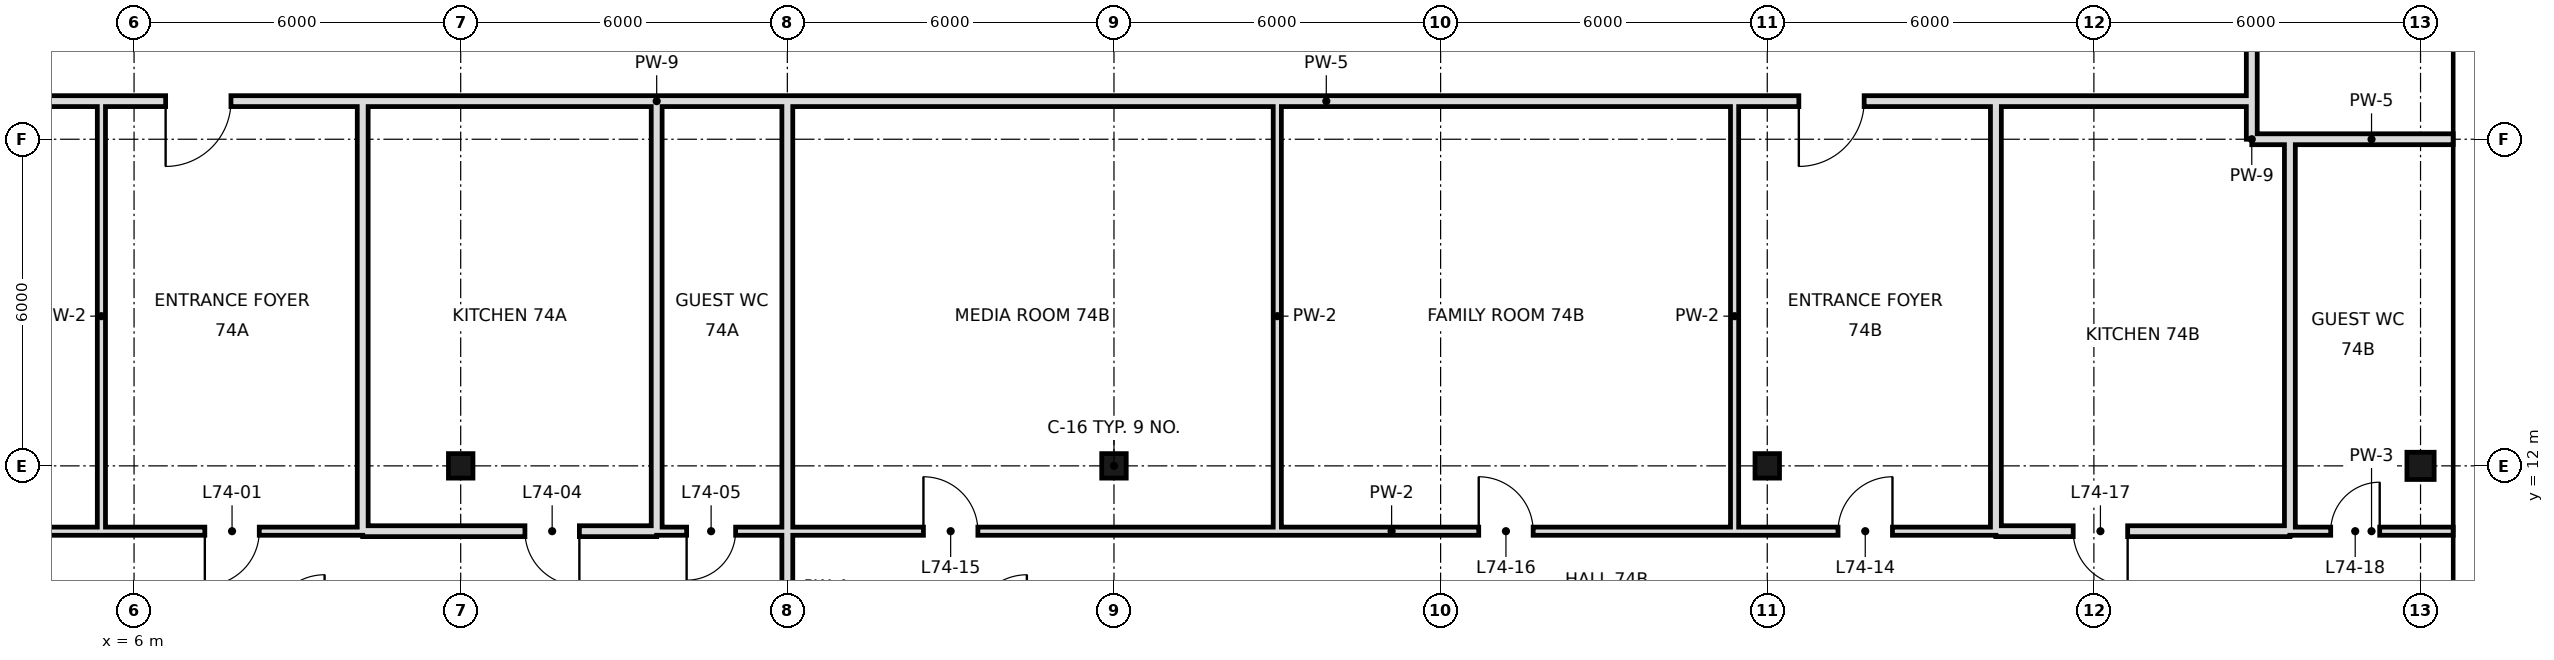
"""IFC4 building model, lengths in metres.
Left out: names, types, materials, properties, quantities, classifications, styles, units other than length and angle.
Written with IfcOpenShell. Run it as: python <this file> out.ifc"""

import sys

from ifc_helpers import new_model, si_unit, direction, frame, frame_2d, origin, origin_2d, place, context, subcontext, project, spatial, rectangle, hollow_rectangle, extrude, element, fill, save


model = new_model("IFC4")
c1 = context("Model", 3, precision=1e-05, world=origin(), true_north=direction((0.0, 1.0)))
c2 = subcontext(c1, "Body", "Model", "MODEL_VIEW")
j1 = project(units=[si_unit("LENGTHUNIT", "METRE"), si_unit("PLANEANGLEUNIT", "RADIAN")], contexts=[c1])
p1 = place(None, origin())
s1 = spatial("IfcSite", under=j1, at=p1, CompositionType="ELEMENT")
p2 = place(p1, origin())
s2 = spatial("IfcBuilding", under=s1, at=p2, CompositionType="ELEMENT")
p3 = place(p2, frame((0.0, 0.0, 312.4)))
s3 = spatial("IfcBuildingStorey", under=s2, at=p3, CompositionType="ELEMENT", Elevation=312.4)
for number, where, z_axis, x_axis in (
    (1, (12.0, 12.0, 0.0), (0.0, 0.0, 1.0), (1.0, 0.0, 0.0)),
    (2, (24.0, 12.0, 0.0), (0.0, 0.0, 1.0), (1.0, 0.0, 0.0)),
    (3, (36.0, 12.0, 0.0), (0.0, 0.0, 1.0), (1.0, 0.0, 0.0)),
):
    element("IfcColumn", number, at=place(p3, frame(where, z_axis=z_axis, x_axis=x_axis)), inside=s3, PredefinedType="COLUMN", context=c2, shape_type="SweptSolid", body=[
        extrude(hollow_rectangle(XDim=0.45, YDim=0.45, WallThickness=0.022, at=origin_2d()), origin(), (0.0, 0.0, 1.0), 3.6),
    ])
p4 = place(p3, frame((48.0, 12.0, 0.0), z_axis=(0.0, 0.0, 1.0), x_axis=(1.0, 0.0, 0.0)))
e4 = element("IfcColumn", 4, at=p4, inside=s3, PredefinedType="COLUMN", context=c2, shape_type="SweptSolid", body=[
    extrude(hollow_rectangle(XDim=0.5, YDim=0.5, WallThickness=0.025, at=origin_2d()), origin(), (0.0, 0.0, 1.0), 3.6),
])
for number, where, z_axis, x_axis in (
    (5, (10.2, 10.8, 0.0), (0.0, 0.0, 1.0), (0.0, 1.0, 0.0)),
    (6, (15.6, 10.8, 0.0), (0.0, 0.0, 1.0), (0.0, 1.0, 0.0)),
):
    element("IfcWall", number, at=place(p3, frame(where, z_axis=z_axis, x_axis=x_axis)), inside=s3, PredefinedType="SOLIDWALL", context=c2, shape_type="SweptSolid", body=[
        extrude(rectangle(XDim=7.9, YDim=0.2, at=frame_2d((3.95, 0.0))), origin(), (0.0, 0.0, 1.0), 2.72),
    ])
p5 = place(p3, frame((18.0, -0.6, 0.0), z_axis=(0.0, 0.0, 1.0), x_axis=(0.0, 1.0, 0.0)))
e7 = element("IfcWall", 7, at=p5, inside=s3, PredefinedType="SOLIDWALL", context=c2, shape_type="SweptSolid", body=[
    extrude(rectangle(XDim=19.3, YDim=0.2, at=frame_2d((9.65, 0.0))), origin(), (0.0, 0.0, 1.0), 2.72),
])
for number, where, z_axis, x_axis in (
    (8, (27.0, 10.8, 0.0), (0.0, 0.0, 1.0), (0.0, 1.0, 0.0)),
    (9, (35.4, 10.8, 0.0), (0.0, 0.0, 1.0), (0.0, 1.0, 0.0)),
):
    element("IfcWall", number, at=place(p3, frame(where, z_axis=z_axis, x_axis=x_axis)), inside=s3, PredefinedType="PARTITIONING", context=c2, shape_type="SweptSolid", body=[
        extrude(rectangle(XDim=7.9, YDim=0.15, at=frame_2d((3.95, 0.0))), origin(), (0.0, 0.0, 1.0), 3.42),
    ])
p6 = place(p3, frame((40.2, 10.8, 0.0), z_axis=(0.0, 0.0, 1.0), x_axis=(0.0, 1.0, 0.0)))
e10 = element("IfcWall", 10, at=p6, inside=s3, PredefinedType="SOLIDWALL", context=c2, shape_type="SweptSolid", body=[
    extrude(rectangle(XDim=7.9, YDim=0.2, at=frame_2d((3.95, 0.0))), origin(), (0.0, 0.0, 1.0), 2.72),
])
p7 = place(p3, frame((44.9, 18.7, 0.0), z_axis=(0.0, 0.0, 1.0), x_axis=(0.0, 1.0, 0.0)))
e11 = element("IfcWall", 11, at=p7, inside=s3, PredefinedType="SOLIDWALL", context=c2, shape_type="SweptSolid", body=[
    extrude(rectangle(XDim=27.249, YDim=0.2, at=frame_2d((13.625, 0.0))), origin(), (0.0, 0.0, 1.0), 2.97),
])
p8 = place(p7, frame((7.66, 0.0, 0.0)))
e12 = element("IfcOpeningElement", 12, at=p8, cuts=e11, PredefinedType="OPENING", context=c2, shape_type="SweptSolid", body=[
    extrude(rectangle(XDim=1.2, YDim=2.4, at=frame_2d((0.6, 1.2))), frame((0.0, 0.11, 0.0), z_axis=(0.0, -1.0, 0.0), x_axis=(1.0, 0.0, 0.0)), (0.0, 0.0, 1.0), 0.22),
])
p9 = place(p3, frame((44.9, 18.0, 0.0), z_axis=(0.0, 0.0, 1.0), x_axis=(0.0, 1.0, 0.0)))
e13 = element("IfcWall", 13, at=p9, inside=s3, PredefinedType="SOLIDWALL", context=c2, shape_type="SweptSolid", body=[
    extrude(rectangle(XDim=0.7, YDim=0.2, at=frame_2d((0.35, 0.0))), origin(), (0.0, 0.0, 1.0), 2.97),
])
p10 = place(p3, frame((45.6, 10.8, 0.0), z_axis=(0.0, 0.0, 1.0), x_axis=(0.0, 1.0, 0.0)))
e14 = element("IfcWall", 14, at=p10, inside=s3, PredefinedType="SOLIDWALL", context=c2, shape_type="SweptSolid", body=[
    extrude(rectangle(XDim=7.2, YDim=0.2, at=frame_2d((3.6, 0.0))), origin(), (0.0, 0.0, 1.0), 2.72),
])
p11 = place(p3, frame((5.4, 10.8, 0.0), z_axis=(0.0, 0.0, 1.0), x_axis=(0.0, 1.0, 0.0)))
e15 = element("IfcWall", 15, at=p11, inside=s3, PredefinedType="PARTITIONING", context=c2, shape_type="SweptSolid", body=[
    extrude(rectangle(XDim=7.9, YDim=0.15, at=frame_2d((3.95, 0.0))), origin(), (0.0, 0.0, 1.0), 3.42),
])
p12 = place(p3, frame((10.2, 10.8, 0.0), z_axis=(0.0, 0.0, 1.0), x_axis=(1.0, 0.0, 0.0)))
e16 = element("IfcWall", 16, at=p12, inside=s3, PredefinedType="SOLIDWALL", context=c2, shape_type="SweptSolid", body=[
    extrude(rectangle(XDim=5.4, YDim=0.2, at=frame_2d((2.7, 0.0))), origin(), (0.0, 0.0, 1.0), 2.72),
])
p13 = place(p12, frame((2.98, 0.0, 0.0)))
e17 = element("IfcOpeningElement", 17, at=p13, cuts=e16, PredefinedType="OPENING", context=c2, shape_type="SweptSolid", body=[
    extrude(rectangle(XDim=1.0, YDim=2.4, at=frame_2d((0.5, 1.2))), frame((0.0, 0.11, 0.0), z_axis=(0.0, -1.0, 0.0), x_axis=(1.0, 0.0, 0.0)), (0.0, 0.0, 1.0), 0.22),
])
p14 = place(p3, frame((40.2, 10.8, 0.0), z_axis=(0.0, 0.0, 1.0), x_axis=(1.0, 0.0, 0.0)))
e18 = element("IfcWall", 18, at=p14, inside=s3, PredefinedType="SOLIDWALL", context=c2, shape_type="SweptSolid", body=[
    extrude(rectangle(XDim=5.4, YDim=0.2, at=frame_2d((2.7, 0.0))), origin(), (0.0, 0.0, 1.0), 2.72),
])
p15 = place(p14, frame((1.42, 0.0, 0.0)))
e19 = element("IfcOpeningElement", 19, at=p15, cuts=e18, PredefinedType="OPENING", context=c2, shape_type="SweptSolid", body=[
    extrude(rectangle(XDim=1.0, YDim=2.4, at=frame_2d((0.5, 1.2))), frame((0.0, 0.11, 0.0), z_axis=(0.0, -1.0, 0.0), x_axis=(1.0, 0.0, 0.0)), (0.0, 0.0, 1.0), 0.22),
])
p16 = place(p3, frame((-18.6, 10.8, 0.0), z_axis=(0.0, 0.0, 1.0), x_axis=(1.0, 0.0, 0.0)))
e20 = element("IfcWall", 20, at=p16, inside=s3, PredefinedType="PARTITIONING", context=c2, shape_type="SweptSolid", body=[
    extrude(rectangle(XDim=28.8, YDim=0.15, at=frame_2d((14.4, 0.0))), origin(), (0.0, 0.0, 1.0), 3.42),
])
p17 = place(p16, frame((25.9, 0.0, 0.0)))
e21 = element("IfcOpeningElement", 21, at=p17, cuts=e20, PredefinedType="OPENING", context=c2, shape_type="SweptSolid", body=[
    extrude(rectangle(XDim=1.0, YDim=2.4, at=frame_2d((0.5, 1.2))), frame((0.0, 0.085, 0.0), z_axis=(0.0, -1.0, 0.0), x_axis=(1.0, 0.0, 0.0)), (0.0, 0.0, 1.0), 0.17),
])
p18 = place(p16, frame((11.35, 0.0, 0.0)))
e22 = element("IfcOpeningElement", 22, at=p18, cuts=e20, PredefinedType="OPENING", context=c2, shape_type="SweptSolid", body=[
    extrude(rectangle(XDim=1.0, YDim=2.4, at=frame_2d((0.5, 1.2))), frame((0.0, 0.085, 0.0), z_axis=(0.0, -1.0, 0.0), x_axis=(1.0, 0.0, 0.0)), (0.0, 0.0, 1.0), 0.17),
])
p19 = place(p16, frame((15.82, 0.0, 0.0)))
e23 = element("IfcOpeningElement", 23, at=p19, cuts=e20, PredefinedType="OPENING", context=c2, shape_type="SweptSolid", body=[
    extrude(rectangle(XDim=1.0, YDim=2.4, at=frame_2d((0.5, 1.2))), frame((0.0, 0.085, 0.0), z_axis=(0.0, -1.0, 0.0), x_axis=(1.0, 0.0, 0.0)), (0.0, 0.0, 1.0), 0.17),
])
p20 = place(p3, frame((18.0, 10.8, 0.0), z_axis=(0.0, 0.0, 1.0), x_axis=(1.0, 0.0, 0.0)))
e24 = element("IfcWall", 24, at=p20, inside=s3, PredefinedType="PARTITIONING", context=c2, shape_type="SweptSolid", body=[
    extrude(rectangle(XDim=22.2, YDim=0.15, at=frame_2d((11.1, 0.0))), origin(), (0.0, 0.0, 1.0), 3.42),
])
p21 = place(p20, frame((19.3, 0.0, 0.0)))
e25 = element("IfcOpeningElement", 25, at=p21, cuts=e24, PredefinedType="OPENING", context=c2, shape_type="SweptSolid", body=[
    extrude(rectangle(XDim=1.0, YDim=2.4, at=frame_2d((0.5, 1.2))), frame((0.0, 0.085, 0.0), z_axis=(0.0, -1.0, 0.0), x_axis=(1.0, 0.0, 0.0)), (0.0, 0.0, 1.0), 0.17),
])
p22 = place(p20, frame((2.5, 0.0, 0.0)))
e26 = element("IfcOpeningElement", 26, at=p22, cuts=e24, PredefinedType="OPENING", context=c2, shape_type="SweptSolid", body=[
    extrude(rectangle(XDim=1.0, YDim=2.4, at=frame_2d((0.5, 1.2))), frame((0.0, 0.085, 0.0), z_axis=(0.0, -1.0, 0.0), x_axis=(1.0, 0.0, 0.0)), (0.0, 0.0, 1.0), 0.17),
])
p23 = place(p20, frame((12.7, 0.0, 0.0)))
e27 = element("IfcOpeningElement", 27, at=p23, cuts=e24, PredefinedType="OPENING", context=c2, shape_type="SweptSolid", body=[
    extrude(rectangle(XDim=1.0, YDim=2.4, at=frame_2d((0.5, 1.2))), frame((0.0, 0.085, 0.0), z_axis=(0.0, -1.0, 0.0), x_axis=(1.0, 0.0, 0.0)), (0.0, 0.0, 1.0), 0.17),
])
p24 = place(p3, frame((15.6, 10.8, 0.0), z_axis=(0.0, 0.0, 1.0), x_axis=(1.0, 0.0, 0.0)))
e28 = element("IfcWall", 28, at=p24, inside=s3, PredefinedType="PARTITIONING", context=c2, shape_type="SweptSolid", body=[
    extrude(rectangle(XDim=2.4, YDim=0.15, at=frame_2d((1.2, 0.0))), origin(), (0.0, 0.0, 1.0), 3.42),
])
p25 = place(p24, frame((0.55, 0.0, 0.0)))
e29 = element("IfcOpeningElement", 29, at=p25, cuts=e28, PredefinedType="OPENING", context=c2, shape_type="SweptSolid", body=[
    extrude(rectangle(XDim=0.9, YDim=2.4, at=frame_2d((0.45, 1.2))), frame((0.0, 0.085, 0.0), z_axis=(0.0, -1.0, 0.0), x_axis=(1.0, 0.0, 0.0)), (0.0, 0.0, 1.0), 0.17),
])
p26 = place(p3, frame((45.6, 10.8, 0.0), z_axis=(0.0, 0.0, 1.0), x_axis=(1.0, 0.0, 0.0)))
e30 = element("IfcWall", 30, at=p26, inside=s3, PredefinedType="PARTITIONING", context=c2, shape_type="SweptSolid", body=[
    extrude(rectangle(XDim=3.0, YDim=0.15, at=frame_2d((1.5, 0.0))), origin(), (0.0, 0.0, 1.0), 3.42),
])
p27 = place(p26, frame((0.75, 0.0, 0.0)))
e31 = element("IfcOpeningElement", 31, at=p27, cuts=e30, PredefinedType="OPENING", context=c2, shape_type="SweptSolid", body=[
    extrude(rectangle(XDim=0.9, YDim=2.4, at=frame_2d((0.45, 1.2))), frame((0.0, 0.085, 0.0), z_axis=(0.0, -1.0, 0.0), x_axis=(1.0, 0.0, 0.0)), (0.0, 0.0, 1.0), 0.17),
])
p28 = place(p3, frame((45.6, 18.0, 0.0), z_axis=(0.0, 0.0, 1.0), x_axis=(1.0, 0.0, 0.0)))
e32 = element("IfcWall", 32, at=p28, inside=s3, PredefinedType="SOLIDWALL", context=c2, shape_type="SweptSolid", body=[
    extrude(rectangle(XDim=3.0, YDim=0.2, at=frame_2d((1.5, 0.0))), origin(), (0.0, 0.0, 1.0), 2.72),
])
p29 = place(p3, frame((44.9, 18.0, 0.0), z_axis=(0.0, 0.0, 1.0), x_axis=(1.0, 0.0, 0.0)))
e33 = element("IfcWall", 33, at=p29, inside=s3, PredefinedType="SOLIDWALL", context=c2, shape_type="SweptSolid", body=[
    extrude(rectangle(XDim=0.7, YDim=0.2, at=frame_2d((0.35, 0.0))), origin(), (0.0, 0.0, 1.0), 2.97),
])
p30 = place(p3, frame((3.1, 18.7, 0.0), z_axis=(0.0, 0.0, 1.0), x_axis=(1.0, 0.0, 0.0)))
e34 = element("IfcWall", 34, at=p30, inside=s3, PredefinedType="SOLIDWALL", context=c2, shape_type="SweptSolid", body=[
    extrude(rectangle(XDim=7.1, YDim=0.2, at=frame_2d((3.55, 0.0))), origin(), (0.0, 0.0, 1.0), 2.72),
])
p31 = place(p30, frame((3.48, 0.0, 0.0)))
e35 = element("IfcOpeningElement", 35, at=p31, cuts=e34, PredefinedType="OPENING", context=c2, shape_type="SweptSolid", body=[
    extrude(rectangle(XDim=1.2, YDim=2.4, at=frame_2d((0.6, 1.2))), frame((0.0, 0.11, 0.0), z_axis=(0.0, -1.0, 0.0), x_axis=(1.0, 0.0, 0.0)), (0.0, 0.0, 1.0), 0.22),
])
p32 = place(p3, frame((15.6, 18.7, 0.0), z_axis=(0.0, 0.0, 1.0), x_axis=(1.0, 0.0, 0.0)))
e36 = element("IfcWall", 36, at=p32, inside=s3, PredefinedType="SOLIDWALL", context=c2, shape_type="SweptSolid", body=[
    extrude(rectangle(XDim=24.6, YDim=0.2, at=frame_2d((12.3, 0.0))), origin(), (0.0, 0.0, 1.0), 2.72),
])
p33 = place(p32, frame((20.98, 0.0, 0.0)))
e37 = element("IfcOpeningElement", 37, at=p33, cuts=e36, PredefinedType="OPENING", context=c2, shape_type="SweptSolid", body=[
    extrude(rectangle(XDim=1.2, YDim=2.4, at=frame_2d((0.6, 1.2))), frame((0.0, 0.11, 0.0), z_axis=(0.0, -1.0, 0.0), x_axis=(1.0, 0.0, 0.0)), (0.0, 0.0, 1.0), 0.22),
])
p34 = place(p3, frame((10.2, 18.7, 0.0), z_axis=(0.0, 0.0, 1.0), x_axis=(1.0, 0.0, 0.0)))
e38 = element("IfcWall", 38, at=p34, inside=s3, PredefinedType="SOLIDWALL", context=c2, shape_type="SweptSolid", body=[
    extrude(rectangle(XDim=5.4, YDim=0.2, at=frame_2d((2.7, 0.0))), origin(), (0.0, 0.0, 1.0), 3.42),
])
p35 = place(p3, frame((40.2, 18.7, 0.0), z_axis=(0.0, 0.0, 1.0), x_axis=(1.0, 0.0, 0.0)))
e39 = element("IfcWall", 39, at=p35, inside=s3, PredefinedType="SOLIDWALL", context=c2, shape_type="SweptSolid", body=[
    extrude(rectangle(XDim=4.7, YDim=0.2, at=frame_2d((2.35, 0.0))), origin(), (0.0, 0.0, 1.0), 2.72),
])
p36 = place(p17, frame((1.0, 0.0, 0.0), z_axis=(0.0, 0.0, 1.0), x_axis=(-1.0, 0.0, 0.0)))
e40 = element("IfcDoor", 40, at=p36, inside=s3, OperationType="SINGLE_SWING_RIGHT", PredefinedType="DOOR", context=c2, shape_type="SweptSolid", body=[
    extrude(rectangle(XDim=1.0, YDim=2.4, at=frame_2d((0.5, 1.2))), frame((0.0, 0.025, 0.0), z_axis=(0.0, -1.0, 0.0), x_axis=(1.0, 0.0, 0.0)), (0.0, 0.0, 1.0), 0.05),
])
fill(e21, e40)
p37 = place(p13, origin())
e41 = element("IfcDoor", 41, at=p37, inside=s3, OperationType="SINGLE_SWING_RIGHT", PredefinedType="DOOR", context=c2, shape_type="SweptSolid", body=[
    extrude(rectangle(XDim=1.0, YDim=2.4, at=frame_2d((0.5, 1.2))), frame((0.0, 0.025, 0.0), z_axis=(0.0, -1.0, 0.0), x_axis=(1.0, 0.0, 0.0)), (0.0, 0.0, 1.0), 0.05),
])
fill(e17, e41)
p38 = place(p25, frame((0.9, 0.0, 0.0), z_axis=(0.0, 0.0, 1.0), x_axis=(-1.0, 0.0, 0.0)))
e42 = element("IfcDoor", 42, at=p38, inside=s3, OperationType="SINGLE_SWING_RIGHT", PredefinedType="DOOR", context=c2, shape_type="SweptSolid", body=[
    extrude(rectangle(XDim=0.9, YDim=2.4, at=frame_2d((0.45, 1.2))), frame((0.0, 0.025, 0.0), z_axis=(0.0, -1.0, 0.0), x_axis=(1.0, 0.0, 0.0)), (0.0, 0.0, 1.0), 0.05),
])
fill(e29, e42)
p39 = place(p21, frame((1.0, 0.0, 0.0), z_axis=(0.0, 0.0, 1.0), x_axis=(-1.0, 0.0, 0.0)))
e43 = element("IfcDoor", 43, at=p39, inside=s3, OperationType="SINGLE_SWING_LEFT", PredefinedType="DOOR", context=c2, shape_type="SweptSolid", body=[
    extrude(rectangle(XDim=1.0, YDim=2.4, at=frame_2d((0.5, 1.2))), frame((0.0, 0.025, 0.0), z_axis=(0.0, -1.0, 0.0), x_axis=(1.0, 0.0, 0.0)), (0.0, 0.0, 1.0), 0.05),
])
fill(e25, e43)
p40 = place(p22, origin())
e44 = element("IfcDoor", 44, at=p40, inside=s3, OperationType="SINGLE_SWING_LEFT", PredefinedType="DOOR", context=c2, shape_type="SweptSolid", body=[
    extrude(rectangle(XDim=1.0, YDim=2.4, at=frame_2d((0.5, 1.2))), frame((0.0, 0.025, 0.0), z_axis=(0.0, -1.0, 0.0), x_axis=(1.0, 0.0, 0.0)), (0.0, 0.0, 1.0), 0.05),
])
fill(e26, e44)
p41 = place(p23, origin())
e45 = element("IfcDoor", 45, at=p41, inside=s3, OperationType="SINGLE_SWING_LEFT", PredefinedType="DOOR", context=c2, shape_type="SweptSolid", body=[
    extrude(rectangle(XDim=1.0, YDim=2.4, at=frame_2d((0.5, 1.2))), frame((0.0, 0.025, 0.0), z_axis=(0.0, -1.0, 0.0), x_axis=(1.0, 0.0, 0.0)), (0.0, 0.0, 1.0), 0.05),
])
fill(e27, e45)
p42 = place(p15, origin())
e46 = element("IfcDoor", 46, at=p42, inside=s3, OperationType="SINGLE_SWING_RIGHT", PredefinedType="DOOR", context=c2, shape_type="SweptSolid", body=[
    extrude(rectangle(XDim=1.0, YDim=2.4, at=frame_2d((0.5, 1.2))), frame((0.0, 0.025, 0.0), z_axis=(0.0, -1.0, 0.0), x_axis=(1.0, 0.0, 0.0)), (0.0, 0.0, 1.0), 0.05),
])
fill(e19, e46)
p43 = place(p27, frame((0.9, 0.0, 0.0), z_axis=(0.0, 0.0, 1.0), x_axis=(-1.0, 0.0, 0.0)))
e47 = element("IfcDoor", 47, at=p43, inside=s3, OperationType="SINGLE_SWING_LEFT", PredefinedType="DOOR", context=c2, shape_type="SweptSolid", body=[
    extrude(rectangle(XDim=0.9, YDim=2.4, at=frame_2d((0.45, 1.2))), frame((0.0, 0.025, 0.0), z_axis=(0.0, -1.0, 0.0), x_axis=(1.0, 0.0, 0.0)), (0.0, 0.0, 1.0), 0.05),
])
fill(e31, e47)
p44 = place(p31, frame((1.2, 0.0, 0.0), z_axis=(0.0, 0.0, 1.0), x_axis=(-1.0, 0.0, 0.0)))
e48 = element("IfcDoor", 48, at=p44, inside=s3, OperationType="SINGLE_SWING_RIGHT", PredefinedType="DOOR", context=c2, shape_type="SweptSolid", body=[
    extrude(rectangle(XDim=1.2, YDim=2.4, at=frame_2d((0.6, 1.2))), frame((0.0, 0.025, 0.0), z_axis=(0.0, -1.0, 0.0), x_axis=(1.0, 0.0, 0.0)), (0.0, 0.0, 1.0), 0.05),
])
fill(e35, e48)
p45 = place(p33, frame((1.2, 0.0, 0.0), z_axis=(0.0, 0.0, 1.0), x_axis=(-1.0, 0.0, 0.0)))
e49 = element("IfcDoor", 49, at=p45, inside=s3, OperationType="SINGLE_SWING_RIGHT", PredefinedType="DOOR", context=c2, shape_type="SweptSolid", body=[
    extrude(rectangle(XDim=1.2, YDim=2.4, at=frame_2d((0.6, 1.2))), frame((0.0, 0.025, 0.0), z_axis=(0.0, -1.0, 0.0), x_axis=(1.0, 0.0, 0.0)), (0.0, 0.0, 1.0), 0.05),
])
fill(e37, e49)
save(model, sys.argv[1])
